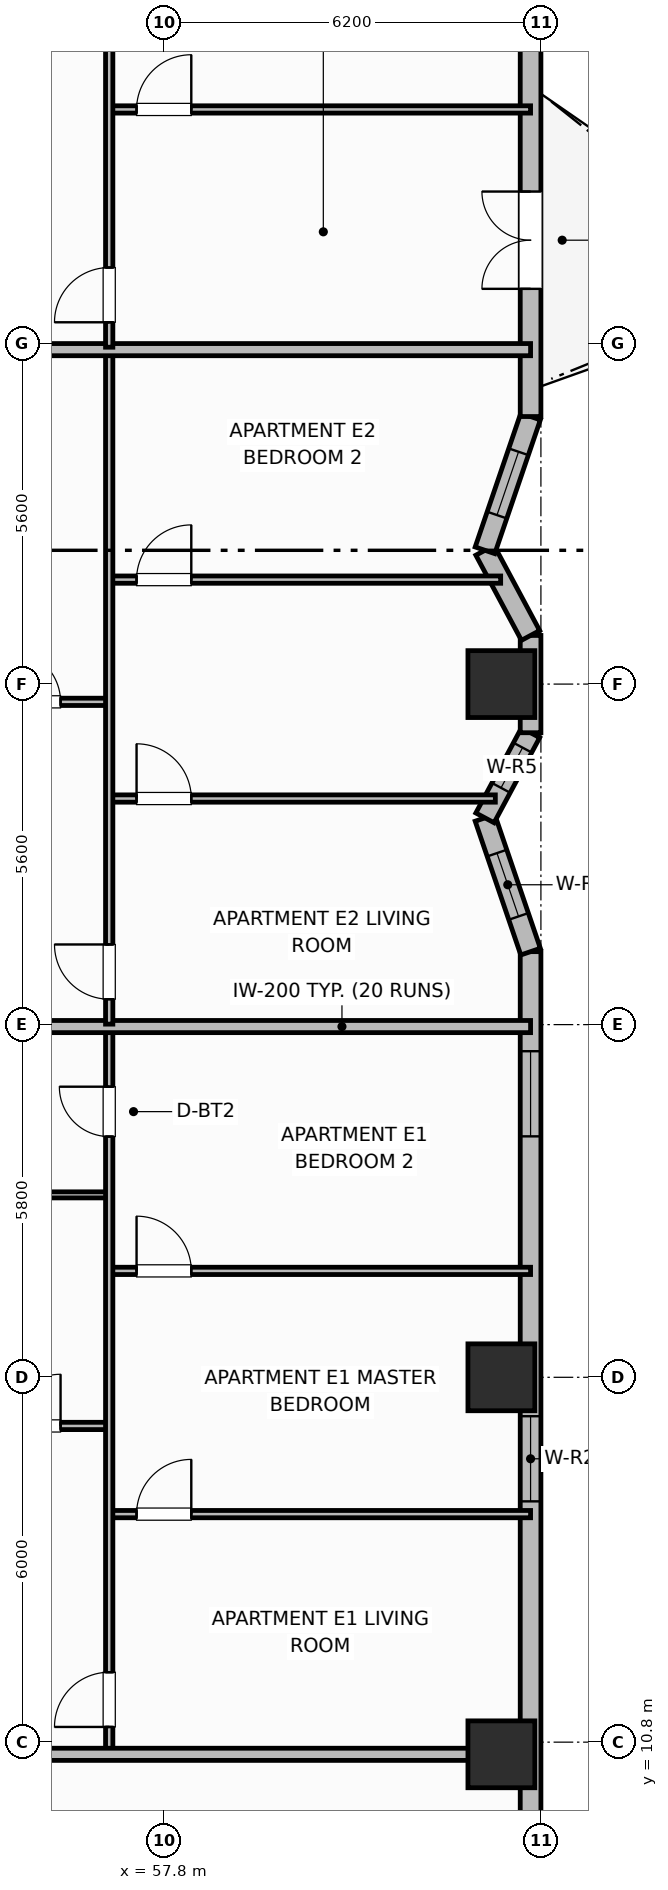
"""IFC4 building model, lengths in metres.
Left out: names, types, materials, properties, quantities, classifications, styles, units other than length and angle.
Written with IfcOpenShell. Run it as: python <this file> out.ifc"""

import sys

from ifc_helpers import new_model, si_unit, direction, frame, frame_2d, origin, origin_2d, place, context, subcontext, project, spatial, rectangle, extrude, element, fill, save


model = new_model("IFC4")
c1 = context("Model", 3, precision=1e-05, world=origin(), true_north=direction((0.0, 1.0)))
c2 = subcontext(c1, "Body", "Model", "MODEL_VIEW")
j1 = project(units=[si_unit("LENGTHUNIT", "METRE"), si_unit("PLANEANGLEUNIT", "RADIAN")], contexts=[c1])
p1 = place(None, origin())
s1 = spatial("IfcSite", under=j1, at=p1, CompositionType="ELEMENT")
p2 = place(p1, origin())
s2 = spatial("IfcBuilding", under=s1, at=p2, CompositionType="ELEMENT")
p3 = place(p2, frame((0.0, 0.0, 125.3)))
s3 = spatial("IfcBuildingStorey", under=s2, at=p3, CompositionType="ELEMENT", Elevation=125.3)
for number, where, z_axis, x_axis in (
    (1, (63.35, 10.6, 0.0), (0.0, 0.0, 1.0), (1.0, 0.0, 0.0)),
    (2, (63.35, 16.8, 0.0), (0.0, 0.0, 1.0), (1.0, 0.0, 0.0)),
    (3, (63.35, 28.2, 0.0), (0.0, 0.0, 1.0), (1.0, 0.0, 0.0)),
):
    element("IfcColumn", number, at=place(p3, frame(where, z_axis=z_axis, x_axis=x_axis)), inside=s3, PredefinedType="COLUMN", context=c2, shape_type="SweptSolid", body=[
        extrude(rectangle(XDim=1.1, YDim=1.1, at=origin_2d()), origin(), (0.0, 0.0, 1.0), 3.7),
    ])
p4 = place(p3, frame((63.83, 9.0, 0.0), z_axis=(0.0, 0.0, 1.0), x_axis=(0.0, 1.0, 0.0)))
e4 = element("IfcWall", 4, at=p4, inside=s3, PredefinedType="SOLIDWALL", context=c2, shape_type="SweptSolid", body=[
    extrude(rectangle(XDim=14.8, YDim=0.34, at=frame_2d((7.4, 0.0))), origin(), (0.0, 0.0, 1.0), 2.7),
])
p5 = place(p4, frame((5.76, 0.0, 0.69)))
e5 = element("IfcOpeningElement", 5, at=p5, cuts=e4, PredefinedType="OPENING", context=c2, shape_type="SweptSolid", body=[
    extrude(rectangle(XDim=1.4, YDim=1.85, at=frame_2d((0.7, 0.925))), frame((0.0, 0.18, 0.0), z_axis=(0.0, -1.0, 0.0), x_axis=(1.0, 0.0, 0.0)), (0.0, 0.0, 1.0), 0.36),
])
p6 = place(p4, frame((11.762, 0.0, 0.73)))
e6 = element("IfcOpeningElement", 6, at=p6, cuts=e4, PredefinedType="OPENING", context=c2, shape_type="SweptSolid", body=[
    extrude(rectangle(XDim=1.4, YDim=1.85, at=frame_2d((0.7, 0.925))), frame((0.0, 0.18, 0.0), z_axis=(0.0, -1.0, 0.0), x_axis=(1.0, 0.0, 0.0)), (0.0, 0.0, 1.0), 0.36),
])
p7 = place(p3, frame((63.83, 23.8, 0.0), z_axis=(0.0, 0.0, 1.0), x_axis=(-0.322680343871, 0.946508000853, 0.0)))
e7 = element("IfcWall", 7, at=p7, inside=s3, PredefinedType="SOLIDWALL", context=c2, shape_type="SweptSolid", body=[
    extrude(rectangle(XDim=2.324, YDim=0.34, at=frame_2d((1.162, 0.0))), origin(), (0.0, 0.0, 1.0), 2.7),
])
p8 = place(p7, frame((0.612, 0.0, 0.89)))
e8 = element("IfcOpeningElement", 8, at=p8, cuts=e7, PredefinedType="OPENING", context=c2, shape_type="SweptSolid", body=[
    extrude(rectangle(XDim=1.1, YDim=1.65, at=frame_2d((0.55, 0.825))), frame((0.0, 0.18, 0.0), z_axis=(0.0, -1.0, 0.0), x_axis=(1.0, 0.0, 0.0)), (0.0, 0.0, 1.0), 0.36),
])
p9 = place(p3, frame((63.08, 26.0, 0.0), z_axis=(0.0, 0.0, 1.0), x_axis=(0.472247007964, 0.881466257703, 0.0)))
e9 = element("IfcWall", 9, at=p9, inside=s3, PredefinedType="SOLIDWALL", context=c2, shape_type="SweptSolid", body=[
    extrude(rectangle(XDim=1.588, YDim=0.34, at=frame_2d((0.794, 0.0))), origin(), (0.0, 0.0, 1.0), 2.7),
])
p10 = place(p9, frame((0.56, 0.0, 0.89)))
e10 = element("IfcOpeningElement", 10, at=p10, cuts=e9, PredefinedType="OPENING", context=c2, shape_type="SweptSolid", body=[
    extrude(rectangle(XDim=0.75, YDim=1.65, at=frame_2d((0.375, 0.825))), frame((0.0, 0.18, 0.0), z_axis=(0.0, -1.0, 0.0), x_axis=(1.0, 0.0, 0.0)), (0.0, 0.0, 1.0), 0.36),
])
p11 = place(p3, frame((63.83, 27.4, 0.0), z_axis=(0.0, 0.0, 1.0), x_axis=(0.0, 1.0, 0.0)))
e11 = element("IfcWall", 11, at=p11, inside=s3, PredefinedType="SOLIDWALL", context=c2, shape_type="SweptSolid", body=[
    extrude(rectangle(XDim=1.6, YDim=0.34, at=frame_2d((0.8, 0.0))), origin(), (0.0, 0.0, 1.0), 2.7),
])
p12 = place(p3, frame((63.83, 29.0, 0.0), z_axis=(0.0, 0.0, 1.0), x_axis=(-0.472247007964, 0.881466257703, 0.0)))
e12 = element("IfcWall", 12, at=p12, inside=s3, PredefinedType="SOLIDWALL", context=c2, shape_type="SweptSolid", body=[
    extrude(rectangle(XDim=1.588, YDim=0.34, at=frame_2d((0.794, 0.0))), origin(), (0.0, 0.0, 1.0), 2.7),
])
p13 = place(p3, frame((63.08, 30.4, 0.0), z_axis=(0.0, 0.0, 1.0), x_axis=(0.32264826586, 0.946518936175, 0.0)))
e13 = element("IfcWall", 13, at=p13, inside=s3, PredefinedType="SOLIDWALL", context=c2, shape_type="SweptSolid", body=[
    extrude(rectangle(XDim=2.324, YDim=0.34, at=frame_2d((1.162, 0.0))), origin(), (0.0, 0.0, 1.0), 2.7),
])
p14 = place(p13, frame((0.612, 0.0, 0.89)))
e14 = element("IfcOpeningElement", 14, at=p14, cuts=e13, PredefinedType="OPENING", context=c2, shape_type="SweptSolid", body=[
    extrude(rectangle(XDim=1.1, YDim=1.65, at=frame_2d((0.55, 0.825))), frame((0.0, 0.18, 0.0), z_axis=(0.0, -1.0, 0.0), x_axis=(1.0, 0.0, 0.0)), (0.0, 0.0, 1.0), 0.36),
])
p15 = place(p3, frame((63.83, 32.6, 0.0), z_axis=(0.0, 0.0, 1.0), x_axis=(0.0, 1.0, 0.0)))
e15 = element("IfcWall", 15, at=p15, inside=s3, PredefinedType="SOLIDWALL", context=c2, shape_type="SweptSolid", body=[
    extrude(rectangle(XDim=14.8, YDim=0.34, at=frame_2d((7.4, 0.0))), origin(), (0.0, 0.0, 1.0), 2.7),
])
p16 = place(p15, frame((2.1, 0.0, 0.0)))
e16 = element("IfcOpeningElement", 16, at=p16, cuts=e15, PredefinedType="OPENING", context=c2, shape_type="SweptSolid", body=[
    extrude(rectangle(XDim=1.6, YDim=2.1, at=frame_2d((0.8, 1.05))), frame((0.0, 0.18, 0.0), z_axis=(0.0, -1.0, 0.0), x_axis=(1.0, 0.0, 0.0)), (0.0, 0.0, 1.0), 0.36),
])
p17 = place(p15, frame((7.6, 0.0, 0.69)))
e17 = element("IfcOpeningElement", 17, at=p17, cuts=e15, PredefinedType="OPENING", context=c2, shape_type="SweptSolid", body=[
    extrude(rectangle(XDim=1.4, YDim=1.85, at=frame_2d((0.7, 0.925))), frame((0.0, 0.18, 0.0), z_axis=(0.0, -1.0, 0.0), x_axis=(1.0, 0.0, 0.0)), (0.0, 0.0, 1.0), 0.36),
])
p18 = place(p15, frame((10.863, 0.0, 0.93)))
e18 = element("IfcOpeningElement", 18, at=p18, cuts=e15, PredefinedType="OPENING", context=c2, shape_type="SweptSolid", body=[
    extrude(rectangle(XDim=1.1, YDim=1.65, at=frame_2d((0.55, 0.825))), frame((0.0, 0.18, 0.0), z_axis=(0.0, -1.0, 0.0), x_axis=(1.0, 0.0, 0.0)), (0.0, 0.0, 1.0), 0.36),
])
p19 = place(p3, frame((54.65, 16.0, 0.0), z_axis=(0.0, 0.0, 1.0), x_axis=(1.0, 0.0, 0.0)))
e19 = element("IfcWall", 19, at=p19, inside=s3, PredefinedType="PARTITIONING", context=c2, shape_type="SweptSolid", body=[
    extrude(rectangle(XDim=2.25, YDim=0.12, at=frame_2d((1.125, 0.0))), origin(), (0.0, 0.0, 1.0), 2.53),
])
p20 = place(p19, frame((0.6, 0.0, 0.0)))
e20 = element("IfcOpeningElement", 20, at=p20, cuts=e19, PredefinedType="OPENING", context=c2, shape_type="SweptSolid", body=[
    extrude(rectangle(XDim=0.85, YDim=2.1, at=frame_2d((0.425, 1.05))), frame((0.0, 0.07, 0.0), z_axis=(0.0, -1.0, 0.0), x_axis=(1.0, 0.0, 0.0)), (0.0, 0.0, 1.0), 0.14),
])
p21 = place(p3, frame((54.65, 19.8, 0.0), z_axis=(0.0, 0.0, 1.0), x_axis=(1.0, 0.0, 0.0)))
e21 = element("IfcWall", 21, at=p21, inside=s3, PredefinedType="PARTITIONING", context=c2, shape_type="SweptSolid", body=[
    extrude(rectangle(XDim=2.25, YDim=0.1, at=frame_2d((1.125, 0.0))), origin(), (0.0, 0.0, 1.0), 2.53),
])
p22 = place(p3, frame((56.9, 14.55, 0.0), z_axis=(0.0, 0.0, 1.0), x_axis=(1.0, 0.0, 0.0)))
e22 = element("IfcWall", 22, at=p22, inside=s3, PredefinedType="PARTITIONING", context=c2, shape_type="SweptSolid", body=[
    extrude(rectangle(XDim=6.93, YDim=0.12, at=frame_2d((3.465, 0.0))), origin(), (0.0, 0.0, 1.0), 2.53),
])
p23 = place(p22, frame((0.45, 0.0, 0.0)))
e23 = element("IfcOpeningElement", 23, at=p23, cuts=e22, PredefinedType="OPENING", context=c2, shape_type="SweptSolid", body=[
    extrude(rectangle(XDim=0.9, YDim=2.1, at=frame_2d((0.45, 1.05))), frame((0.0, 0.07, 0.0), z_axis=(0.0, -1.0, 0.0), x_axis=(1.0, 0.0, 0.0)), (0.0, 0.0, 1.0), 0.14),
])
p24 = place(p3, frame((56.9, 18.55, 0.0), z_axis=(0.0, 0.0, 1.0), x_axis=(1.0, 0.0, 0.0)))
e24 = element("IfcWall", 24, at=p24, inside=s3, PredefinedType="PARTITIONING", context=c2, shape_type="SweptSolid", body=[
    extrude(rectangle(XDim=6.93, YDim=0.12, at=frame_2d((3.465, 0.0))), origin(), (0.0, 0.0, 1.0), 2.53),
])
p25 = place(p24, frame((0.45, 0.0, 0.0)))
e25 = element("IfcOpeningElement", 25, at=p25, cuts=e24, PredefinedType="OPENING", context=c2, shape_type="SweptSolid", body=[
    extrude(rectangle(XDim=0.9, YDim=2.1, at=frame_2d((0.45, 1.05))), frame((0.0, 0.07, 0.0), z_axis=(0.0, -1.0, 0.0), x_axis=(1.0, 0.0, 0.0)), (0.0, 0.0, 1.0), 0.14),
])
p26 = place(p3, frame((56.9, 10.64, 0.0), z_axis=(0.0, 0.0, 1.0), x_axis=(0.0, 1.0, 0.0)))
e26 = element("IfcWall", 26, at=p26, inside=s3, PredefinedType="PARTITIONING", context=c2, shape_type="SweptSolid", body=[
    extrude(rectangle(XDim=11.888, YDim=0.12, at=frame_2d((5.944, 0.0))), origin(), (0.0, 0.0, 1.0), 2.53),
])
p27 = place(p26, frame((0.41, 0.0, 0.0)))
e27 = element("IfcOpeningElement", 27, at=p27, cuts=e26, PredefinedType="OPENING", context=c2, shape_type="SweptSolid", body=[
    extrude(rectangle(XDim=0.9, YDim=2.1, at=frame_2d((0.45, 1.05))), frame((0.0, 0.07, 0.0), z_axis=(0.0, -1.0, 0.0), x_axis=(1.0, 0.0, 0.0)), (0.0, 0.0, 1.0), 0.14),
])
p28 = place(p26, frame((10.119, 0.0, 0.0)))
e28 = element("IfcOpeningElement", 28, at=p28, cuts=e26, PredefinedType="OPENING", context=c2, shape_type="SweptSolid", body=[
    extrude(rectangle(XDim=0.82, YDim=2.08, at=frame_2d((0.41, 1.04))), frame((0.0, 0.07, 0.0), z_axis=(0.0, -1.0, 0.0), x_axis=(1.0, 0.0, 0.0)), (0.0, 0.0, 1.0), 0.14),
])
p29 = place(p3, frame((54.65, 22.568, 0.0), z_axis=(0.0, 0.0, 1.0), x_axis=(1.0, 0.0, 0.0)))
e29 = element("IfcWall", 29, at=p29, inside=s3, PredefinedType="PARTITIONING", context=c2, shape_type="SweptSolid", body=[
    extrude(rectangle(XDim=9.18, YDim=0.2, at=frame_2d((4.59, 0.0))), origin(), (0.0, 0.0, 1.0), 2.53),
])
p30 = place(p3, frame((54.65, 27.908, 0.0), z_axis=(0.0, 0.0, 1.0), x_axis=(1.0, 0.0, 0.0)))
e30 = element("IfcWall", 30, at=p30, inside=s3, PredefinedType="PARTITIONING", context=c2, shape_type="SweptSolid", body=[
    extrude(rectangle(XDim=2.25, YDim=0.12, at=frame_2d((1.125, 0.0))), origin(), (0.0, 0.0, 1.0), 2.53),
])
p31 = place(p30, frame((0.6, 0.0, 0.0)))
e31 = element("IfcOpeningElement", 31, at=p31, cuts=e30, PredefinedType="OPENING", context=c2, shape_type="SweptSolid", body=[
    extrude(rectangle(XDim=0.85, YDim=2.1, at=frame_2d((0.425, 1.05))), frame((0.0, 0.07, 0.0), z_axis=(0.0, -1.0, 0.0), x_axis=(1.0, 0.0, 0.0)), (0.0, 0.0, 1.0), 0.14),
])
p32 = place(p3, frame((56.9, 26.318, 0.0), z_axis=(0.0, 0.0, 1.0), x_axis=(1.0, 0.0, 0.0)))
e32 = element("IfcWall", 32, at=p32, inside=s3, PredefinedType="PARTITIONING", context=c2, shape_type="SweptSolid", body=[
    extrude(rectangle(XDim=6.351, YDim=0.12, at=frame_2d((3.175, 0.0))), origin(), (0.0, 0.0, 1.0), 2.53),
])
p33 = place(p32, frame((0.45, 0.0, 0.0)))
e33 = element("IfcOpeningElement", 33, at=p33, cuts=e32, PredefinedType="OPENING", context=c2, shape_type="SweptSolid", body=[
    extrude(rectangle(XDim=0.9, YDim=2.1, at=frame_2d((0.45, 1.05))), frame((0.0, 0.07, 0.0), z_axis=(0.0, -1.0, 0.0), x_axis=(1.0, 0.0, 0.0)), (0.0, 0.0, 1.0), 0.14),
])
p34 = place(p3, frame((56.9, 29.918, 0.0), z_axis=(0.0, 0.0, 1.0), x_axis=(1.0, 0.0, 0.0)))
e34 = element("IfcWall", 34, at=p34, inside=s3, PredefinedType="PARTITIONING", context=c2, shape_type="SweptSolid", body=[
    extrude(rectangle(XDim=6.438, YDim=0.12, at=frame_2d((3.219, 0.0))), origin(), (0.0, 0.0, 1.0), 2.53),
])
p35 = place(p34, frame((0.45, 0.0, 0.0)))
e35 = element("IfcOpeningElement", 35, at=p35, cuts=e34, PredefinedType="OPENING", context=c2, shape_type="SweptSolid", body=[
    extrude(rectangle(XDim=0.9, YDim=2.1, at=frame_2d((0.45, 1.05))), frame((0.0, 0.07, 0.0), z_axis=(0.0, -1.0, 0.0), x_axis=(1.0, 0.0, 0.0)), (0.0, 0.0, 1.0), 0.14),
])
p36 = place(p3, frame((56.9, 22.608, 0.0), z_axis=(0.0, 0.0, 1.0), x_axis=(0.0, 1.0, 0.0)))
e36 = element("IfcWall", 36, at=p36, inside=s3, PredefinedType="PARTITIONING", context=c2, shape_type="SweptSolid", body=[
    extrude(rectangle(XDim=11.052, YDim=0.12, at=frame_2d((5.526, 0.0))), origin(), (0.0, 0.0, 1.0), 2.53),
])
p37 = place(p36, frame((0.41, 0.0, 0.0)))
e37 = element("IfcOpeningElement", 37, at=p37, cuts=e36, PredefinedType="OPENING", context=c2, shape_type="SweptSolid", body=[
    extrude(rectangle(XDim=0.9, YDim=2.1, at=frame_2d((0.45, 1.05))), frame((0.0, 0.07, 0.0), z_axis=(0.0, -1.0, 0.0), x_axis=(1.0, 0.0, 0.0)), (0.0, 0.0, 1.0), 0.14),
])
p38 = place(p3, frame((54.65, 33.7, 0.0), z_axis=(0.0, 0.0, 1.0), x_axis=(1.0, 0.0, 0.0)))
e38 = element("IfcWall", 38, at=p38, inside=s3, PredefinedType="PARTITIONING", context=c2, shape_type="SweptSolid", body=[
    extrude(rectangle(XDim=9.18, YDim=0.2, at=frame_2d((4.59, 0.0))), origin(), (0.0, 0.0, 1.0), 2.53),
])
p39 = place(p3, frame((56.9, 37.65, 0.0), z_axis=(0.0, 0.0, 1.0), x_axis=(1.0, 0.0, 0.0)))
e39 = element("IfcWall", 39, at=p39, inside=s3, PredefinedType="PARTITIONING", context=c2, shape_type="SweptSolid", body=[
    extrude(rectangle(XDim=6.93, YDim=0.12, at=frame_2d((3.465, 0.0))), origin(), (0.0, 0.0, 1.0), 2.53),
])
p40 = place(p39, frame((0.45, 0.0, 0.0)))
e40 = element("IfcOpeningElement", 40, at=p40, cuts=e39, PredefinedType="OPENING", context=c2, shape_type="SweptSolid", body=[
    extrude(rectangle(XDim=0.9, YDim=2.1, at=frame_2d((0.45, 1.05))), frame((0.0, 0.07, 0.0), z_axis=(0.0, -1.0, 0.0), x_axis=(1.0, 0.0, 0.0)), (0.0, 0.0, 1.0), 0.14),
])
p41 = place(p3, frame((56.9, 33.74, 0.0), z_axis=(0.0, 0.0, 1.0), x_axis=(0.0, 1.0, 0.0)))
e41 = element("IfcWall", 41, at=p41, inside=s3, PredefinedType="PARTITIONING", context=c2, shape_type="SweptSolid", body=[
    extrude(rectangle(XDim=12.02, YDim=0.12, at=frame_2d((6.01, 0.0))), origin(), (0.0, 0.0, 1.0), 2.53),
])
p42 = place(p41, frame((0.41, 0.0, 0.0)))
e42 = element("IfcOpeningElement", 42, at=p42, cuts=e41, PredefinedType="OPENING", context=c2, shape_type="SweptSolid", body=[
    extrude(rectangle(XDim=0.9, YDim=2.1, at=frame_2d((0.45, 1.05))), frame((0.0, 0.07, 0.0), z_axis=(0.0, -1.0, 0.0), x_axis=(1.0, 0.0, 0.0)), (0.0, 0.0, 1.0), 0.14),
])
p43 = place(p41, frame((10.185, 0.0, 0.0)))
e43 = element("IfcOpeningElement", 43, at=p43, cuts=e41, PredefinedType="OPENING", context=c2, shape_type="SweptSolid", body=[
    extrude(rectangle(XDim=0.82, YDim=2.08, at=frame_2d((0.41, 1.04))), frame((0.0, 0.07, 0.0), z_axis=(0.0, -1.0, 0.0), x_axis=(1.0, 0.0, 0.0)), (0.0, 0.0, 1.0), 0.14),
])
p44 = place(p3, frame((54.65, 10.6, 0.0), z_axis=(0.0, 0.0, 1.0), x_axis=(1.0, 0.0, 0.0)))
e44 = element("IfcWall", 44, at=p44, inside=s3, PredefinedType="PARTITIONING", context=c2, shape_type="SweptSolid", body=[
    extrude(rectangle(XDim=8.76, YDim=0.2, at=frame_2d((4.38, 0.0))), origin(), (0.0, 0.0, 1.0), 2.53),
])
p45 = place(p5, origin())
e45 = element("IfcWindow", 45, at=p45, inside=s3, PartitioningType="SINGLE_PANEL", PredefinedType="WINDOW", context=c2, shape_type="SweptSolid", body=[
    extrude(rectangle(XDim=1.4, YDim=1.85, at=frame_2d((0.7, 0.925))), frame((0.0, 0.03, 0.0), z_axis=(0.0, -1.0, 0.0), x_axis=(1.0, 0.0, 0.0)), (0.0, 0.0, 1.0), 0.06),
])
fill(e5, e45)
p46 = place(p6, origin())
e46 = element("IfcWindow", 46, at=p46, inside=s3, PartitioningType="SINGLE_PANEL", PredefinedType="WINDOW", context=c2, shape_type="SweptSolid", body=[
    extrude(rectangle(XDim=1.4, YDim=1.85, at=frame_2d((0.7, 0.925))), frame((0.0, 0.03, 0.0), z_axis=(0.0, -1.0, 0.0), x_axis=(1.0, 0.0, 0.0)), (0.0, 0.0, 1.0), 0.06),
])
fill(e6, e46)
p47 = place(p8, origin())
e47 = element("IfcWindow", 47, at=p47, inside=s3, PartitioningType="SINGLE_PANEL", PredefinedType="WINDOW", context=c2, shape_type="SweptSolid", body=[
    extrude(rectangle(XDim=1.1, YDim=1.65, at=frame_2d((0.55, 0.825))), frame((0.0, 0.03, 0.0), z_axis=(0.0, -1.0, 0.0), x_axis=(1.0, 0.0, 0.0)), (0.0, 0.0, 1.0), 0.06),
])
fill(e8, e47)
p48 = place(p10, origin())
e48 = element("IfcWindow", 48, at=p48, inside=s3, PartitioningType="SINGLE_PANEL", PredefinedType="WINDOW", context=c2, shape_type="SweptSolid", body=[
    extrude(rectangle(XDim=0.75, YDim=1.65, at=frame_2d((0.375, 0.825))), frame((0.0, 0.03, 0.0), z_axis=(0.0, -1.0, 0.0), x_axis=(1.0, 0.0, 0.0)), (0.0, 0.0, 1.0), 0.06),
])
fill(e10, e48)
p49 = place(p14, origin())
e49 = element("IfcWindow", 49, at=p49, inside=s3, PartitioningType="SINGLE_PANEL", PredefinedType="WINDOW", context=c2, shape_type="SweptSolid", body=[
    extrude(rectangle(XDim=1.1, YDim=1.65, at=frame_2d((0.55, 0.825))), frame((0.0, 0.03, 0.0), z_axis=(0.0, -1.0, 0.0), x_axis=(1.0, 0.0, 0.0)), (0.0, 0.0, 1.0), 0.06),
])
fill(e14, e49)
p50 = place(p16, origin())
e50 = element("IfcDoor", 50, at=p50, inside=s3, OperationType="DOUBLE_DOOR_SINGLE_SWING", PredefinedType="DOOR", context=c2, shape_type="SweptSolid", body=[
    extrude(rectangle(XDim=1.6, YDim=2.1, at=frame_2d((0.8, 1.05))), frame((0.0, 0.025, 0.0), z_axis=(0.0, -1.0, 0.0), x_axis=(1.0, 0.0, 0.0)), (0.0, 0.0, 1.0), 0.05),
])
fill(e16, e50)
p51 = place(p20, origin())
e51 = element("IfcDoor", 51, at=p51, inside=s3, OperationType="SINGLE_SWING_RIGHT", PredefinedType="DOOR", context=c2, shape_type="SweptSolid", body=[
    extrude(rectangle(XDim=0.85, YDim=2.1, at=frame_2d((0.425, 1.05))), frame((0.0, 0.025, 0.0), z_axis=(0.0, -1.0, 0.0), x_axis=(1.0, 0.0, 0.0)), (0.0, 0.0, 1.0), 0.05),
])
fill(e20, e51)
p52 = place(p23, origin())
e52 = element("IfcDoor", 52, at=p52, inside=s3, OperationType="SINGLE_SWING_RIGHT", PredefinedType="DOOR", context=c2, shape_type="SweptSolid", body=[
    extrude(rectangle(XDim=0.9, YDim=2.1, at=frame_2d((0.45, 1.05))), frame((0.0, 0.025, 0.0), z_axis=(0.0, -1.0, 0.0), x_axis=(1.0, 0.0, 0.0)), (0.0, 0.0, 1.0), 0.05),
])
fill(e23, e52)
p53 = place(p25, origin())
e53 = element("IfcDoor", 53, at=p53, inside=s3, OperationType="SINGLE_SWING_LEFT", PredefinedType="DOOR", context=c2, shape_type="SweptSolid", body=[
    extrude(rectangle(XDim=0.9, YDim=2.1, at=frame_2d((0.45, 1.05))), frame((0.0, 0.025, 0.0), z_axis=(0.0, -1.0, 0.0), x_axis=(1.0, 0.0, 0.0)), (0.0, 0.0, 1.0), 0.05),
])
fill(e25, e53)
p54 = place(p27, origin())
e54 = element("IfcDoor", 54, at=p54, inside=s3, OperationType="SINGLE_SWING_LEFT", PredefinedType="DOOR", context=c2, shape_type="SweptSolid", body=[
    extrude(rectangle(XDim=0.9, YDim=2.1, at=frame_2d((0.45, 1.05))), frame((0.0, 0.025, 0.0), z_axis=(0.0, -1.0, 0.0), x_axis=(1.0, 0.0, 0.0)), (0.0, 0.0, 1.0), 0.05),
])
fill(e27, e54)
p55 = place(p28, origin())
e55 = element("IfcDoor", 55, at=p55, inside=s3, OperationType="SINGLE_SWING_RIGHT", PredefinedType="DOOR", context=c2, shape_type="SweptSolid", body=[
    extrude(rectangle(XDim=0.82, YDim=2.08, at=frame_2d((0.41, 1.04))), frame((0.0, 0.025, 0.0), z_axis=(0.0, -1.0, 0.0), x_axis=(1.0, 0.0, 0.0)), (0.0, 0.0, 1.0), 0.05),
])
fill(e28, e55)
p56 = place(p31, origin())
e56 = element("IfcDoor", 56, at=p56, inside=s3, OperationType="SINGLE_SWING_LEFT", PredefinedType="DOOR", context=c2, shape_type="SweptSolid", body=[
    extrude(rectangle(XDim=0.85, YDim=2.1, at=frame_2d((0.425, 1.05))), frame((0.0, 0.025, 0.0), z_axis=(0.0, -1.0, 0.0), x_axis=(1.0, 0.0, 0.0)), (0.0, 0.0, 1.0), 0.05),
])
fill(e31, e56)
p57 = place(p33, origin())
e57 = element("IfcDoor", 57, at=p57, inside=s3, OperationType="SINGLE_SWING_LEFT", PredefinedType="DOOR", context=c2, shape_type="SweptSolid", body=[
    extrude(rectangle(XDim=0.9, YDim=2.1, at=frame_2d((0.45, 1.05))), frame((0.0, 0.025, 0.0), z_axis=(0.0, -1.0, 0.0), x_axis=(1.0, 0.0, 0.0)), (0.0, 0.0, 1.0), 0.05),
])
fill(e33, e57)
p58 = place(p35, origin())
e58 = element("IfcDoor", 58, at=p58, inside=s3, OperationType="SINGLE_SWING_RIGHT", PredefinedType="DOOR", context=c2, shape_type="SweptSolid", body=[
    extrude(rectangle(XDim=0.9, YDim=2.1, at=frame_2d((0.45, 1.05))), frame((0.0, 0.025, 0.0), z_axis=(0.0, -1.0, 0.0), x_axis=(1.0, 0.0, 0.0)), (0.0, 0.0, 1.0), 0.05),
])
fill(e35, e58)
p59 = place(p37, origin())
e59 = element("IfcDoor", 59, at=p59, inside=s3, OperationType="SINGLE_SWING_RIGHT", PredefinedType="DOOR", context=c2, shape_type="SweptSolid", body=[
    extrude(rectangle(XDim=0.9, YDim=2.1, at=frame_2d((0.45, 1.05))), frame((0.0, 0.025, 0.0), z_axis=(0.0, -1.0, 0.0), x_axis=(1.0, 0.0, 0.0)), (0.0, 0.0, 1.0), 0.05),
])
fill(e37, e59)
p60 = place(p40, origin())
e60 = element("IfcDoor", 60, at=p60, inside=s3, OperationType="SINGLE_SWING_RIGHT", PredefinedType="DOOR", context=c2, shape_type="SweptSolid", body=[
    extrude(rectangle(XDim=0.9, YDim=2.1, at=frame_2d((0.45, 1.05))), frame((0.0, 0.025, 0.0), z_axis=(0.0, -1.0, 0.0), x_axis=(1.0, 0.0, 0.0)), (0.0, 0.0, 1.0), 0.05),
])
fill(e40, e60)
p61 = place(p42, origin())
e61 = element("IfcDoor", 61, at=p61, inside=s3, OperationType="SINGLE_SWING_LEFT", PredefinedType="DOOR", context=c2, shape_type="SweptSolid", body=[
    extrude(rectangle(XDim=0.9, YDim=2.1, at=frame_2d((0.45, 1.05))), frame((0.0, 0.025, 0.0), z_axis=(0.0, -1.0, 0.0), x_axis=(1.0, 0.0, 0.0)), (0.0, 0.0, 1.0), 0.05),
])
fill(e42, e61)
save(model, sys.argv[1])
